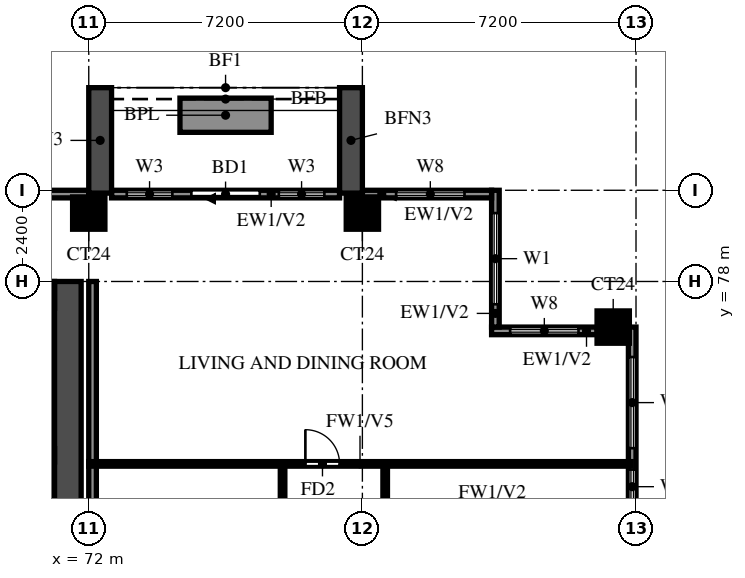
"""IFC4 building model, lengths in metres.
Left out: names, types, materials, properties, quantities, classifications, styles, units other than length and angle.
Written with IfcOpenShell. Run it as: python <this file> out.ifc"""

import sys

from ifc_helpers import new_model, si_unit, direction, frame, frame_2d, origin, origin_2d, place, context, subcontext, project, spatial, rectangle, extrude, source, transform, mapped, element, fill, save


model = new_model("IFC4")
c1 = context("Model", 3, precision=1e-05, world=origin(), true_north=direction((0.0, 1.0)))
c2 = subcontext(c1, "Body", "Model", "MODEL_VIEW")
j1 = project(units=[si_unit("LENGTHUNIT", "METRE"), si_unit("PLANEANGLEUNIT", "RADIAN")], contexts=[c1])
p1 = place(None, origin())
s1 = spatial("IfcSite", under=j1, at=p1, CompositionType="ELEMENT")
p2 = place(p1, origin())
s2 = spatial("IfcBuilding", under=s1, at=p2, CompositionType="ELEMENT")
p3 = place(p2, frame((0.0, 0.0, 167.5)))
s3 = spatial("IfcBuildingStorey", under=s2, at=p3, CompositionType="ELEMENT", Elevation=167.5)
m1 = source(origin(), c2, "Body", "SweptSolid", [
    extrude(rectangle(XDim=0.85, YDim=0.85, at=origin_2d()), origin(), (0.0, 0.0, 1.0), 3.2),
])
for number, where, z_axis, x_axis in (
    (1, (85.8, 76.8, 0.0), (0.0, 0.0, 1.0), (1.0, 0.0, 0.0)),
    (2, (72.0, 79.8, 0.0), (0.0, 0.0, 1.0), (1.0, 0.0, 0.0)),
    (3, (79.2, 79.8, 0.0), (0.0, 0.0, 1.0), (1.0, 0.0, 0.0)),
):
    element("IfcColumn", number, at=place(p3, frame(where, z_axis=z_axis, x_axis=x_axis)), inside=s3, PredefinedType="COLUMN", context=c2, shape_type="MappedRepresentation", body=[
        mapped(m1, transform((0.0, 0.0, 0.0))),
    ])
p4 = place(p3, frame((71.45, 66.1, 0.0), z_axis=(0.0, 0.0, 1.0), x_axis=(0.0, 1.0, 0.0)))
e4 = element("IfcWall", 4, at=p4, inside=s3, PredefinedType="SHEAR", context=c2, shape_type="SweptSolid", body=[
    extrude(rectangle(XDim=11.9, YDim=0.7, at=frame_2d((5.95, 0.0))), origin(), (0.0, 0.0, 1.0), 3.2),
])
p5 = place(p3, frame((29.7, 77.65, 0.0), z_axis=(0.0, 0.0, 1.0), x_axis=(1.0, 0.0, 0.0)))
e5 = element("IfcWall", 5, at=p5, inside=s3, PredefinedType="SHEAR", context=c2, shape_type="SweptSolid", body=[
    extrude(rectangle(XDim=41.4, YDim=0.7, at=frame_2d((20.7, 0.0))), origin(), (0.0, 0.0, 1.0), 3.2),
])
p6 = place(p3, frame((67.975, 73.425, 0.0), z_axis=(0.0, 0.0, 1.0), x_axis=(1.0, 0.0, 0.0)))
e6 = element("IfcWall", 6, at=p6, inside=s3, PredefinedType="SHEAR", context=c2, shape_type="SweptSolid", body=[
    extrude(rectangle(XDim=3.125, YDim=0.35, at=frame_2d((1.562, 0.0))), origin(), (0.0, 0.0, 1.0), 3.2),
])
p7 = place(p3, frame((86.3, 48.2, 0.0), z_axis=(0.0, 0.0, 1.0), x_axis=(0.0, 1.0, 0.0)))
e7 = element("IfcWall", 7, at=p7, inside=s3, PredefinedType="SOLIDWALL", context=c2, shape_type="SweptSolid", body=[
    extrude(rectangle(XDim=28.6, YDim=0.2, at=frame_2d((14.3, 0.0))), origin(), (0.0, 0.0, 1.0), 3.2),
])
p8 = place(p7, frame((4.3, 0.0, 0.0)))
e8 = element("IfcOpeningElement", 8, at=p8, cuts=e7, PredefinedType="OPENING", context=c2, shape_type="SweptSolid", body=[
    extrude(rectangle(XDim=1.8, YDim=2.4, at=frame_2d((0.9, 1.2))), frame((0.0, 0.11, 0.0), z_axis=(0.0, -1.0, 0.0), x_axis=(1.0, 0.0, 0.0)), (0.0, 0.0, 1.0), 0.22),
])
p9 = place(p7, frame((18.7, 0.0, 0.0)))
e9 = element("IfcOpeningElement", 9, at=p9, cuts=e7, PredefinedType="OPENING", context=c2, shape_type="SweptSolid", body=[
    extrude(rectangle(XDim=1.8, YDim=2.4, at=frame_2d((0.9, 1.2))), frame((0.0, 0.11, 0.0), z_axis=(0.0, -1.0, 0.0), x_axis=(1.0, 0.0, 0.0)), (0.0, 0.0, 1.0), 0.22),
])
p10 = place(p7, frame((0.6, 0.0, 0.6)))
e10 = element("IfcOpeningElement", 10, at=p10, cuts=e7, PredefinedType="OPENING", context=c2, shape_type="SweptSolid", body=[
    extrude(rectangle(XDim=1.2, YDim=2.4, at=frame_2d((0.6, 1.2))), frame((0.0, 0.11, 0.0), z_axis=(0.0, -1.0, 0.0), x_axis=(1.0, 0.0, 0.0)), (0.0, 0.0, 1.0), 0.22),
])
p11 = place(p7, frame((2.95, 0.0, 0.6)))
e11 = element("IfcOpeningElement", 11, at=p11, cuts=e7, PredefinedType="OPENING", context=c2, shape_type="SweptSolid", body=[
    extrude(rectangle(XDim=0.9, YDim=2.4, at=frame_2d((0.45, 1.2))), frame((0.0, 0.11, 0.0), z_axis=(0.0, -1.0, 0.0), x_axis=(1.0, 0.0, 0.0)), (0.0, 0.0, 1.0), 0.22),
])
p12 = place(p7, frame((11.012, 0.0, 0.6)))
e12 = element("IfcOpeningElement", 12, at=p12, cuts=e7, PredefinedType="OPENING", context=c2, shape_type="SweptSolid", body=[
    extrude(rectangle(XDim=2.4, YDim=2.4, at=frame_2d((1.2, 1.2))), frame((0.0, 0.11, 0.0), z_axis=(0.0, -1.0, 0.0), x_axis=(1.0, 0.0, 0.0)), (0.0, 0.0, 1.0), 0.22),
])
p13 = place(p7, frame((7.637, 0.0, 1.5)))
e13 = element("IfcOpeningElement", 13, at=p13, cuts=e7, PredefinedType="OPENING", context=c2, shape_type="SweptSolid", body=[
    extrude(rectangle(XDim=0.9, YDim=0.9, at=frame_2d((0.45, 0.45))), frame((0.0, 0.11, 0.0), z_axis=(0.0, -1.0, 0.0), x_axis=(1.0, 0.0, 0.0)), (0.0, 0.0, 1.0), 0.22),
])
p14 = place(p7, frame((9.55, 0.0, 1.5)))
e14 = element("IfcOpeningElement", 14, at=p14, cuts=e7, PredefinedType="OPENING", context=c2, shape_type="SweptSolid", body=[
    extrude(rectangle(XDim=0.9, YDim=0.9, at=frame_2d((0.45, 0.45))), frame((0.0, 0.11, 0.0), z_axis=(0.0, -1.0, 0.0), x_axis=(1.0, 0.0, 0.0)), (0.0, 0.0, 1.0), 0.22),
])
p15 = place(p7, frame((14.688, 0.0, 0.6)))
e15 = element("IfcOpeningElement", 15, at=p15, cuts=e7, PredefinedType="OPENING", context=c2, shape_type="SweptSolid", body=[
    extrude(rectangle(XDim=1.8, YDim=2.4, at=frame_2d((0.9, 1.2))), frame((0.0, 0.11, 0.0), z_axis=(0.0, -1.0, 0.0), x_axis=(1.0, 0.0, 0.0)), (0.0, 0.0, 1.0), 0.22),
])
p16 = place(p7, frame((22.038, 0.0, 1.5)))
e16 = element("IfcOpeningElement", 16, at=p16, cuts=e7, PredefinedType="OPENING", context=c2, shape_type="SweptSolid", body=[
    extrude(rectangle(XDim=0.9, YDim=0.9, at=frame_2d((0.45, 0.45))), frame((0.0, 0.11, 0.0), z_axis=(0.0, -1.0, 0.0), x_axis=(1.0, 0.0, 0.0)), (0.0, 0.0, 1.0), 0.22),
])
p17 = place(p7, frame((23.95, 0.0, 1.5)))
e17 = element("IfcOpeningElement", 17, at=p17, cuts=e7, PredefinedType="OPENING", context=c2, shape_type="SweptSolid", body=[
    extrude(rectangle(XDim=0.9, YDim=0.9, at=frame_2d((0.45, 0.45))), frame((0.0, 0.11, 0.0), z_axis=(0.0, -1.0, 0.0), x_axis=(1.0, 0.0, 0.0)), (0.0, 0.0, 1.0), 0.22),
])
p18 = place(p7, frame((25.413, 0.0, 0.6)))
e18 = element("IfcOpeningElement", 18, at=p18, cuts=e7, PredefinedType="OPENING", context=c2, shape_type="SweptSolid", body=[
    extrude(rectangle(XDim=2.4, YDim=2.4, at=frame_2d((1.2, 1.2))), frame((0.0, 0.11, 0.0), z_axis=(0.0, -1.0, 0.0), x_axis=(1.0, 0.0, 0.0)), (0.0, 0.0, 1.0), 0.22),
])
p19 = place(p3, frame((85.375, 76.7, 0.0), z_axis=(0.0, 0.0, 1.0), x_axis=(-1.0, 0.0, 0.0)))
e19 = element("IfcWall", 19, at=p19, inside=s3, PredefinedType="SOLIDWALL", context=c2, shape_type="SweptSolid", body=[
    extrude(rectangle(XDim=2.775, YDim=0.2, at=frame_2d((1.387, 0.0))), origin(), (0.0, 0.0, 1.0), 3.2),
])
p20 = place(p19, frame((0.488, 0.0, 0.6)))
e20 = element("IfcOpeningElement", 20, at=p20, cuts=e19, PredefinedType="OPENING", context=c2, shape_type="SweptSolid", body=[
    extrude(rectangle(XDim=1.8, YDim=2.4, at=frame_2d((0.9, 1.2))), frame((0.0, 0.11, 0.0), z_axis=(0.0, -1.0, 0.0), x_axis=(1.0, 0.0, 0.0)), (0.0, 0.0, 1.0), 0.22),
])
p21 = place(p3, frame((82.7, 76.8, 0.0), z_axis=(0.0, 0.0, 1.0), x_axis=(0.0, 1.0, 0.0)))
e21 = element("IfcWall", 21, at=p21, inside=s3, PredefinedType="SOLIDWALL", context=c2, shape_type="SweptSolid", body=[
    extrude(rectangle(XDim=3.6, YDim=0.2, at=frame_2d((1.8, 0.0))), origin(), (0.0, 0.0, 1.0), 3.2),
])
p22 = place(p21, frame((0.6, 0.0, 0.6)))
e22 = element("IfcOpeningElement", 22, at=p22, cuts=e21, PredefinedType="OPENING", context=c2, shape_type="SweptSolid", body=[
    extrude(rectangle(XDim=2.4, YDim=2.4, at=frame_2d((1.2, 1.2))), frame((0.0, 0.11, 0.0), z_axis=(0.0, -1.0, 0.0), x_axis=(1.0, 0.0, 0.0)), (0.0, 0.0, 1.0), 0.22),
])
p23 = place(p3, frame((82.6, 80.3, 0.0), z_axis=(0.0, 0.0, 1.0), x_axis=(-1.0, 0.0, 0.0)))
e23 = element("IfcWall", 23, at=p23, inside=s3, PredefinedType="SOLIDWALL", context=c2, shape_type="SweptSolid", body=[
    extrude(rectangle(XDim=3.4, YDim=0.2, at=frame_2d((1.7, 0.0))), origin(), (0.0, 0.0, 1.0), 3.2),
])
p24 = place(p23, frame((0.712, 0.0, 0.6)))
e24 = element("IfcOpeningElement", 24, at=p24, cuts=e23, PredefinedType="OPENING", context=c2, shape_type="SweptSolid", body=[
    extrude(rectangle(XDim=1.8, YDim=2.4, at=frame_2d((0.9, 1.2))), frame((0.0, 0.11, 0.0), z_axis=(0.0, -1.0, 0.0), x_axis=(1.0, 0.0, 0.0)), (0.0, 0.0, 1.0), 0.22),
])
p25 = place(p3, frame((78.6, 80.3, 0.0), z_axis=(0.0, 0.0, 1.0), x_axis=(-1.0, 0.0, 0.0)))
e25 = element("IfcWall", 25, at=p25, inside=s3, PredefinedType="SOLIDWALL", context=c2, shape_type="SweptSolid", body=[
    extrude(rectangle(XDim=6.0, YDim=0.2, at=frame_2d((3.0, 0.0))), origin(), (0.0, 0.0, 1.0), 3.2),
])
p26 = place(p25, frame((2.1, 0.0, 0.0)))
e26 = element("IfcOpeningElement", 26, at=p26, cuts=e25, PredefinedType="OPENING", context=c2, shape_type="SweptSolid", body=[
    extrude(rectangle(XDim=1.8, YDim=2.4, at=frame_2d((0.9, 1.2))), frame((0.0, 0.11, 0.0), z_axis=(0.0, -1.0, 0.0), x_axis=(1.0, 0.0, 0.0)), (0.0, 0.0, 1.0), 0.22),
])
p27 = place(p25, frame((0.4, 0.0, 0.6)))
e27 = element("IfcOpeningElement", 27, at=p27, cuts=e25, PredefinedType="OPENING", context=c2, shape_type="SweptSolid", body=[
    extrude(rectangle(XDim=1.2, YDim=2.4, at=frame_2d((0.6, 1.2))), frame((0.0, 0.11, 0.0), z_axis=(0.0, -1.0, 0.0), x_axis=(1.0, 0.0, 0.0)), (0.0, 0.0, 1.0), 0.22),
])
p28 = place(p25, frame((4.4, 0.0, 0.6)))
e28 = element("IfcOpeningElement", 28, at=p28, cuts=e25, PredefinedType="OPENING", context=c2, shape_type="SweptSolid", body=[
    extrude(rectangle(XDim=1.2, YDim=2.4, at=frame_2d((0.6, 1.2))), frame((0.0, 0.11, 0.0), z_axis=(0.0, -1.0, 0.0), x_axis=(1.0, 0.0, 0.0)), (0.0, 0.0, 1.0), 0.22),
])
p29 = place(p3, frame((72.0, 80.3, 0.0), z_axis=(0.0, 0.0, 1.0), x_axis=(-1.0, 0.0, 0.0)))
e29 = element("IfcWall", 29, at=p29, inside=s3, PredefinedType="SOLIDWALL", context=c2, shape_type="SweptSolid", body=[
    extrude(rectangle(XDim=54.0, YDim=0.2, at=frame_2d((27.0, 0.0))), origin(), (0.0, 0.0, 1.0), 3.2),
])
p30 = place(p29, frame((44.158, 0.0, 0.6)))
e30 = element("IfcOpeningElement", 30, at=p30, cuts=e29, PredefinedType="OPENING", context=c2, shape_type="SweptSolid", body=[
    extrude(rectangle(XDim=2.4, YDim=2.4, at=frame_2d((1.2, 1.2))), frame((0.0, 0.11, 0.0), z_axis=(0.0, -1.0, 0.0), x_axis=(1.0, 0.0, 0.0)), (0.0, 0.0, 1.0), 0.22),
])
p31 = place(p29, frame((47.042, 0.0, 0.6)))
e31 = element("IfcOpeningElement", 31, at=p31, cuts=e29, PredefinedType="OPENING", context=c2, shape_type="SweptSolid", body=[
    extrude(rectangle(XDim=2.4, YDim=2.4, at=frame_2d((1.2, 1.2))), frame((0.0, 0.11, 0.0), z_axis=(0.0, -1.0, 0.0), x_axis=(1.0, 0.0, 0.0)), (0.0, 0.0, 1.0), 0.22),
])
p32 = place(p29, frame((51.387, 0.0, 0.6)))
e32 = element("IfcOpeningElement", 32, at=p32, cuts=e29, PredefinedType="OPENING", context=c2, shape_type="SweptSolid", body=[
    extrude(rectangle(XDim=1.8, YDim=2.4, at=frame_2d((0.9, 1.2))), frame((0.0, 0.11, 0.0), z_axis=(0.0, -1.0, 0.0), x_axis=(1.0, 0.0, 0.0)), (0.0, 0.0, 1.0), 0.22),
])
for number, where, z_axis, x_axis in (
    (33, (78.9, 80.325, 0.0), (0.0, 0.0, 1.0), (0.0, 1.0, 0.0)),
    (34, (72.3, 80.325, 0.0), (0.0, 0.0, 1.0), (0.0, 1.0, 0.0)),
):
    element("IfcWall", number, at=place(p3, frame(where, z_axis=z_axis, x_axis=x_axis)), inside=s3, PredefinedType="SOLIDWALL", context=c2, shape_type="SweptSolid", body=[
        extrude(rectangle(XDim=2.775, YDim=0.6, at=frame_2d((1.388, 0.0))), origin(), (0.0, 0.0, 1.0), 2.85),
    ])
p33 = place(p3, frame((76.8, 82.375, 0.0), z_axis=(0.0, 0.0, 1.0), x_axis=(-1.0, 0.0, 0.0)))
e35 = element("IfcWall", 35, at=p33, inside=s3, PredefinedType="SOLIDWALL", context=c2, shape_type="SweptSolid", body=[
    extrude(rectangle(XDim=2.4, YDim=0.9, at=frame_2d((1.2, 0.0))), origin(), (0.0, 0.0, 1.0), 0.9),
])
p34 = place(p3, frame((72.1, 62.4, 0.0), z_axis=(0.0, 0.0, 1.0), x_axis=(0.0, 1.0, 0.0)))
e36 = element("IfcWall", 36, at=p34, inside=s3, PredefinedType="SOLIDWALL", context=c2, shape_type="SweptSolid", body=[
    extrude(rectangle(XDim=15.6, YDim=0.2, at=frame_2d((7.8, 0.0))), origin(), (0.0, 0.0, 1.0), 3.2),
])
p35 = place(p3, frame((72.0, 73.2, 0.0), z_axis=(0.0, 0.0, 1.0), x_axis=(1.0, 0.0, 0.0)))
e37 = element("IfcWall", 37, at=p35, inside=s3, PredefinedType="PARTITIONING", context=c2, shape_type="SweptSolid", body=[
    extrude(rectangle(XDim=14.275, YDim=0.12, at=frame_2d((7.137, 0.0))), origin(), (0.0, 0.0, 1.0), 2.3),
])
p36 = place(p35, frame((5.7, 0.0, 0.0)))
e38 = element("IfcOpeningElement", 38, at=p36, cuts=e37, PredefinedType="OPENING", context=c2, shape_type="SweptSolid", body=[
    extrude(rectangle(XDim=0.9, YDim=2.1, at=frame_2d((0.45, 1.05))), frame((0.0, 0.07, 0.0), z_axis=(0.0, -1.0, 0.0), x_axis=(1.0, 0.0, 0.0)), (0.0, 0.0, 1.0), 0.14),
])
p37 = place(p3, frame((77.1, 64.8, 0.0), z_axis=(0.0, 0.0, 1.0), x_axis=(0.0, 1.0, 0.0)))
e39 = element("IfcWall", 39, at=p37, inside=s3, PredefinedType="PARTITIONING", context=c2, shape_type="SweptSolid", body=[
    extrude(rectangle(XDim=8.4, YDim=0.12, at=frame_2d((4.2, 0.0))), origin(), (0.0, 0.0, 1.0), 3.2),
])
p38 = place(p37, frame((5.675, 0.0, 0.0)))
e40 = element("IfcOpeningElement", 40, at=p38, cuts=e39, PredefinedType="OPENING", context=c2, shape_type="SweptSolid", body=[
    extrude(rectangle(XDim=0.9, YDim=2.1, at=frame_2d((0.45, 1.05))), frame((0.0, 0.07, 0.0), z_axis=(0.0, -1.0, 0.0), x_axis=(1.0, 0.0, 0.0)), (0.0, 0.0, 1.0), 0.14),
])
p39 = place(p3, frame((79.8, 69.6, 0.0), z_axis=(0.0, 0.0, 1.0), x_axis=(0.0, 1.0, 0.0)))
e41 = element("IfcWall", 41, at=p39, inside=s3, PredefinedType="PARTITIONING", context=c2, shape_type="SweptSolid", body=[
    extrude(rectangle(XDim=3.6, YDim=0.12, at=frame_2d((1.8, 0.0))), origin(), (0.0, 0.0, 1.0), 3.2),
])
p40 = place(p17, origin())
e42 = element("IfcWindow", 42, at=p40, inside=s3, PartitioningType="SINGLE_PANEL", PredefinedType="WINDOW", context=c2, shape_type="SweptSolid", body=[
    extrude(rectangle(XDim=0.9, YDim=0.9, at=frame_2d((0.45, 0.45))), frame((0.0, 0.03, 0.0), z_axis=(0.0, -1.0, 0.0), x_axis=(1.0, 0.0, 0.0)), (0.0, 0.0, 1.0), 0.06),
])
fill(e17, e42)
p41 = place(p18, origin())
e43 = element("IfcWindow", 43, at=p41, inside=s3, PartitioningType="DOUBLE_PANEL_VERTICAL", PredefinedType="WINDOW", context=c2, shape_type="SweptSolid", body=[
    extrude(rectangle(XDim=2.4, YDim=2.4, at=frame_2d((1.2, 1.2))), frame((0.0, 0.03, 0.0), z_axis=(0.0, -1.0, 0.0), x_axis=(1.0, 0.0, 0.0)), (0.0, 0.0, 1.0), 0.06),
])
fill(e18, e43)
p42 = place(p20, origin())
e44 = element("IfcWindow", 44, at=p42, inside=s3, PartitioningType="DOUBLE_PANEL_VERTICAL", PredefinedType="WINDOW", context=c2, shape_type="SweptSolid", body=[
    extrude(rectangle(XDim=1.8, YDim=2.4, at=frame_2d((0.9, 1.2))), frame((0.0, 0.03, 0.0), z_axis=(0.0, -1.0, 0.0), x_axis=(1.0, 0.0, 0.0)), (0.0, 0.0, 1.0), 0.06),
])
fill(e20, e44)
p43 = place(p22, origin())
e45 = element("IfcWindow", 45, at=p43, inside=s3, PartitioningType="DOUBLE_PANEL_VERTICAL", PredefinedType="WINDOW", context=c2, shape_type="SweptSolid", body=[
    extrude(rectangle(XDim=2.4, YDim=2.4, at=frame_2d((1.2, 1.2))), frame((0.0, 0.03, 0.0), z_axis=(0.0, -1.0, 0.0), x_axis=(1.0, 0.0, 0.0)), (0.0, 0.0, 1.0), 0.06),
])
fill(e22, e45)
p44 = place(p24, origin())
e46 = element("IfcWindow", 46, at=p44, inside=s3, PartitioningType="DOUBLE_PANEL_VERTICAL", PredefinedType="WINDOW", context=c2, shape_type="SweptSolid", body=[
    extrude(rectangle(XDim=1.8, YDim=2.4, at=frame_2d((0.9, 1.2))), frame((0.0, 0.03, 0.0), z_axis=(0.0, -1.0, 0.0), x_axis=(1.0, 0.0, 0.0)), (0.0, 0.0, 1.0), 0.06),
])
fill(e24, e46)
p45 = place(p26, origin())
e47 = element("IfcDoor", 47, at=p45, inside=s3, OperationType="DOUBLE_DOOR_SLIDING", PredefinedType="DOOR", context=c2, shape_type="SweptSolid", body=[
    extrude(rectangle(XDim=1.8, YDim=2.4, at=frame_2d((0.9, 1.2))), frame((0.0, 0.025, 0.0), z_axis=(0.0, -1.0, 0.0), x_axis=(1.0, 0.0, 0.0)), (0.0, 0.0, 1.0), 0.05),
])
fill(e26, e47)
p46 = place(p27, origin())
e48 = element("IfcWindow", 48, at=p46, inside=s3, PartitioningType="SINGLE_PANEL", PredefinedType="WINDOW", context=c2, shape_type="SweptSolid", body=[
    extrude(rectangle(XDim=1.2, YDim=2.4, at=frame_2d((0.6, 1.2))), frame((0.0, 0.03, 0.0), z_axis=(0.0, -1.0, 0.0), x_axis=(1.0, 0.0, 0.0)), (0.0, 0.0, 1.0), 0.06),
])
fill(e27, e48)
p47 = place(p28, origin())
e49 = element("IfcWindow", 49, at=p47, inside=s3, PartitioningType="SINGLE_PANEL", PredefinedType="WINDOW", context=c2, shape_type="SweptSolid", body=[
    extrude(rectangle(XDim=1.2, YDim=2.4, at=frame_2d((0.6, 1.2))), frame((0.0, 0.03, 0.0), z_axis=(0.0, -1.0, 0.0), x_axis=(1.0, 0.0, 0.0)), (0.0, 0.0, 1.0), 0.06),
])
fill(e28, e49)
p48 = place(p36, origin())
e50 = element("IfcDoor", 50, at=p48, inside=s3, OperationType="SINGLE_SWING_RIGHT", PredefinedType="DOOR", context=c2, shape_type="SweptSolid", body=[
    extrude(rectangle(XDim=0.9, YDim=2.1, at=frame_2d((0.45, 1.05))), frame((0.0, 0.025, 0.0), z_axis=(0.0, -1.0, 0.0), x_axis=(1.0, 0.0, 0.0)), (0.0, 0.0, 1.0), 0.05),
])
fill(e38, e50)
save(model, sys.argv[1])
